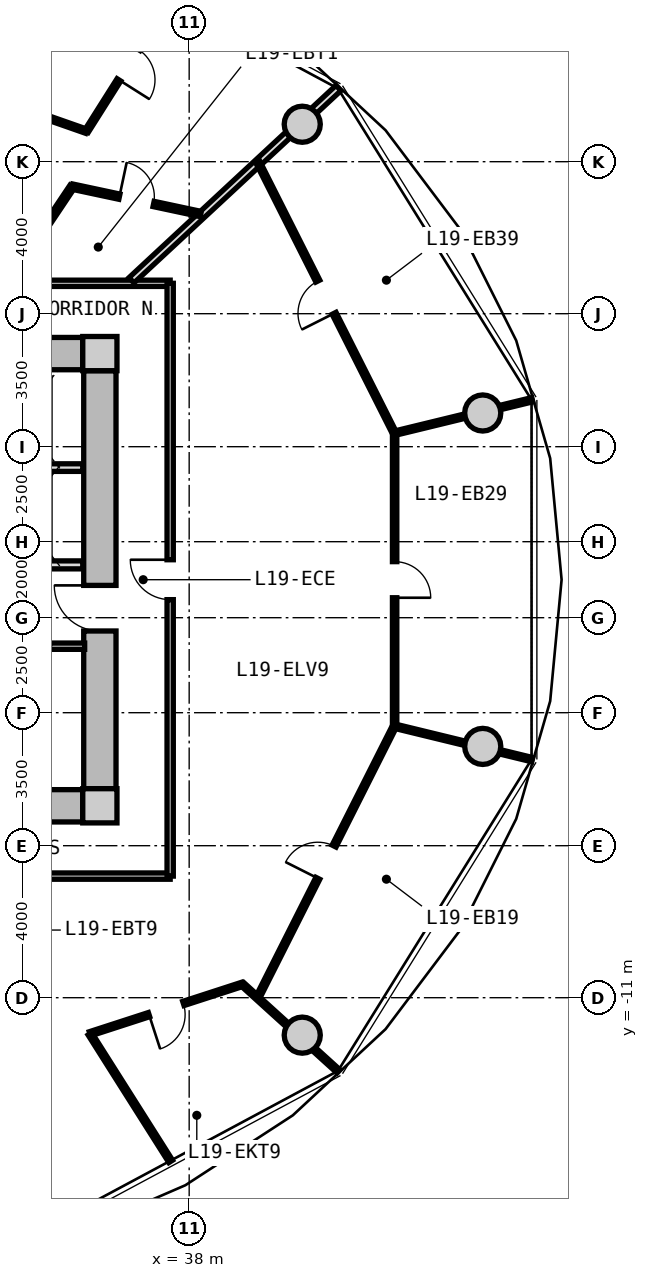
"""IFC4 building model, lengths in metres.
Left out: names, types, materials, properties, quantities, classifications, styles, units other than length and angle.
Written with IfcOpenShell. Run it as: python <this file> out.ifc"""

import sys

from ifc_helpers import new_model, si_unit, direction, frame, frame_2d, origin, origin_2d, place, context, subcontext, project, spatial, rectangle, circle, extrude, source, transform, mapped, element, fill, save


model = new_model("IFC4")
c1 = context("Model", 3, precision=1e-05, world=origin(), true_north=direction((0.0, 1.0)))
c2 = subcontext(c1, "Body", "Model", "MODEL_VIEW")
j1 = project(units=[si_unit("LENGTHUNIT", "METRE"), si_unit("PLANEANGLEUNIT", "RADIAN")], contexts=[c1])
p1 = place(None, origin())
s1 = spatial("IfcSite", under=j1, at=p1, CompositionType="ELEMENT")
p2 = place(p1, origin())
s2 = spatial("IfcBuilding", under=s1, at=p2, CompositionType="ELEMENT")
p3 = place(p2, frame((0.0, 0.0, 64.3)))
s3 = spatial("IfcBuildingStorey", under=s2, at=p3, CompositionType="ELEMENT", Elevation=64.3)
m1 = source(origin(), c2, "Body", "SweptSolid", [
    extrude(rectangle(XDim=0.9, YDim=0.9, at=origin_2d()), origin(), (0.0, 0.0, 1.0), 3.05),
])
for number, where, z_axis, x_axis in (
    (1, (35.65, -5.95, 0.0), (0.0, 0.0, 1.0), (1.0, 0.0, 0.0)),
    (2, (35.65, 5.95, 0.0), (0.0, 0.0, 1.0), (1.0, 0.0, 0.0)),
):
    element("IfcColumn", number, at=place(p3, frame(where, z_axis=z_axis, x_axis=x_axis)), inside=s3, PredefinedType="COLUMN", context=c2, shape_type="MappedRepresentation", body=[
        mapped(m1, transform((0.0, 0.0, 0.0), x_axis=(1.0, 0.0, 0.0), y_axis=(0.0, 1.0, 0.0), z_axis=(0.0, 0.0, 1.0), scale=1.0)),
    ])
m2 = source(origin(), c2, "Body", "SweptSolid", [
    extrude(rectangle(XDim=14.4, YDim=0.85, at=frame_2d((7.2, 0.0))), origin(), (0.0, 0.0, 1.0), 2.79),
])
for number, where, z_axis, x_axis in (
    (3, (20.8, 5.95, 0.0), (0.0, 0.0, 1.0), (1.0, 0.0, 0.0)),
    (4, (35.2, -5.95, 0.0), (0.0, 0.0, 1.0), (-1.0, 0.0, 0.0)),
):
    element("IfcWall", number, at=place(p3, frame(where, z_axis=z_axis, x_axis=x_axis)), inside=s3, PredefinedType="SHEAR", context=c2, shape_type="MappedRepresentation", body=[
        mapped(m2, transform((0.0, 0.0, 0.0), x_axis=(1.0, 0.0, 0.0), y_axis=(0.0, 1.0, 0.0), z_axis=(0.0, 0.0, 1.0), scale=1.0)),
    ])
m3 = source(origin(), c2, "Body", "SweptSolid", [
    extrude(rectangle(XDim=11.0, YDim=0.85, at=frame_2d((5.5, 0.0))), origin(), (0.0, 0.0, 1.0), 2.79),
])
p4 = place(p3, frame((35.65, 5.5, 0.0), z_axis=(0.0, 0.0, 1.0), x_axis=(0.0, -1.0, 0.0)))
e5 = element("IfcWall", 5, at=p4, inside=s3, PredefinedType="SHEAR", context=c2, shape_type="MappedRepresentation", body=[
    mapped(m3, transform((0.0, 0.0, 0.0), x_axis=(1.0, 0.0, 0.0), y_axis=(0.0, 1.0, 0.0), z_axis=(0.0, 0.0, 1.0), scale=1.0)),
])
p5 = place(p4, frame((5.65, 0.0, 0.0)))
e6 = element("IfcOpeningElement", 6, at=p5, cuts=e5, PredefinedType="OPENING", context=c2, shape_type="SweptSolid", body=[
    extrude(rectangle(XDim=1.2, YDim=2.15, at=frame_2d((0.6, 1.075))), frame((0.0, 0.435, 0.0), z_axis=(0.0, -1.0, 0.0), x_axis=(1.0, 0.0, 0.0)), (0.0, 0.0, 1.0), 0.87),
])
m4 = source(origin(), c2, "Body", "SweptSolid", [
    extrude(circle(Radius=0.475, at=origin_2d()), origin(), (0.0, 0.0, 1.0), 3.05),
])
for number, where, z_axis, x_axis in (
    (7, (45.725, 4.387, 0.0), (0.0, 0.0, 1.0), (1.0, 0.0, 0.0)),
    (8, (40.975, 11.985, 0.0), (0.0, 0.0, 1.0), (1.0, 0.0, 0.0)),
    (9, (40.975, -11.985, 0.0), (0.0, 0.0, 1.0), (1.0, 0.0, 0.0)),
    (10, (45.725, -4.387, 0.0), (0.0, 0.0, 1.0), (1.0, 0.0, 0.0)),
):
    element("IfcColumn", number, at=place(p3, frame(where, z_axis=z_axis, x_axis=x_axis)), inside=s3, PredefinedType="COLUMN", context=c2, shape_type="MappedRepresentation", body=[
        mapped(m4, transform((0.0, 0.0, 0.0), x_axis=(1.0, 0.0, 0.0), y_axis=(0.0, 1.0, 0.0), z_axis=(0.0, 0.0, 1.0), scale=1.0)),
    ])
m5 = source(origin(), c2, "Body", "SweptSolid", [
    extrude(rectangle(XDim=3.2, YDim=0.2, at=frame_2d((1.6, 0.0))), origin(), (0.0, 0.0, 1.0), 2.775),
])
p6 = place(p3, frame((32.0, 2.95, 0.0), z_axis=(0.0, 0.0, 1.0), x_axis=(1.0, 0.0, 0.0)))
e11 = element("IfcWall", 11, at=p6, inside=s3, PredefinedType="PARTITIONING", context=c2, shape_type="MappedRepresentation", body=[
    mapped(m5, transform((0.0, 0.0, 0.0), x_axis=(1.0, 0.0, 0.0), y_axis=(0.0, 1.0, 0.0), z_axis=(0.0, 0.0, 1.0), scale=1.0)),
])
m6 = source(origin(), c2, "Body", "SweptSolid", [
    extrude(rectangle(XDim=6.66, YDim=0.21, at=frame_2d((3.33, 0.0))), origin(), (0.0, 0.0, 1.0), 2.775),
])
p7 = place(p3, frame((28.54, 0.39, 0.0), z_axis=(0.0, 0.0, 1.0), x_axis=(1.0, 0.0, 0.0)))
e12 = element("IfcWall", 12, at=p7, inside=s3, PredefinedType="PARTITIONING", context=c2, shape_type="MappedRepresentation", body=[
    mapped(m6, transform((0.0, 0.0, 0.0), x_axis=(1.0, 0.0, 0.0), y_axis=(0.0, 1.0, 0.0), z_axis=(0.0, 0.0, 1.0), scale=1.0)),
])
p8 = place(p7, frame((1.0, 0.0, 0.0)))
e13 = element("IfcOpeningElement", 13, at=p8, cuts=e12, PredefinedType="OPENING", context=c2, shape_type="SweptSolid", body=[
    extrude(rectangle(XDim=1.2, YDim=2.15, at=frame_2d((0.6, 1.075))), frame((0.0, 0.115, 0.0), z_axis=(0.0, -1.0, 0.0), x_axis=(1.0, 0.0, 0.0)), (0.0, 0.0, 1.0), 0.23),
])
m7 = source(origin(), c2, "Body", "SweptSolid", [
    extrude(rectangle(XDim=2.7, YDim=0.165, at=frame_2d((1.35, 0.0))), origin(), (0.0, 0.0, 1.0), 2.775),
])
p9 = place(p3, frame((32.55, -1.75, 0.0), z_axis=(0.0, 0.0, 1.0), x_axis=(1.0, 0.0, 0.0)))
e14 = element("IfcWall", 14, at=p9, inside=s3, PredefinedType="PARTITIONING", context=c2, shape_type="MappedRepresentation", body=[
    mapped(m7, transform((0.0, 0.0, 0.0), x_axis=(1.0, 0.0, 0.0), y_axis=(0.0, 1.0, 0.0), z_axis=(0.0, 0.0, 1.0), scale=1.0)),
])
p10 = place(p9, frame((0.85, 0.0, 0.0)))
e15 = element("IfcOpeningElement", 15, at=p10, cuts=e14, PredefinedType="OPENING", context=c2, shape_type="SweptSolid", body=[
    extrude(rectangle(XDim=0.925, YDim=2.1, at=frame_2d((0.462, 1.05))), frame((0.0, 0.093, 0.0), z_axis=(0.0, -1.0, 0.0), x_axis=(1.0, 0.0, 0.0)), (0.0, 0.0, 1.0), 0.185),
])
m8 = source(origin(), c2, "Body", "SweptSolid", [
    extrude(rectangle(XDim=19.0, YDim=0.165, at=frame_2d((9.5, 0.0))), origin(), (0.0, 0.0, 1.0), 2.775),
])
p11 = place(p3, frame((18.5, 7.8, 0.0), z_axis=(0.0, 0.0, 1.0), x_axis=(1.0, 0.0, 0.0)))
e16 = element("IfcWall", 16, at=p11, inside=s3, PredefinedType="PARTITIONING", context=c2, shape_type="MappedRepresentation", body=[
    mapped(m8, transform((0.0, 0.0, 0.0), x_axis=(1.0, 0.0, 0.0), y_axis=(0.0, 1.0, 0.0), z_axis=(0.0, 0.0, 1.0), scale=1.0)),
])
p12 = place(p11, frame((6.961, 0.0, 0.0)))
e17 = element("IfcOpeningElement", 17, at=p12, cuts=e16, PredefinedType="OPENING", context=c2, shape_type="SweptSolid", body=[
    extrude(rectangle(XDim=1.05, YDim=2.15, at=frame_2d((0.525, 1.075))), frame((0.0, 0.093, 0.0), z_axis=(0.0, -1.0, 0.0), x_axis=(1.0, 0.0, 0.0)), (0.0, 0.0, 1.0), 0.185),
])
p13 = place(p3, frame((37.5, -7.8, 0.0), z_axis=(0.0, 0.0, 1.0), x_axis=(-1.0, 0.0, 0.0)))
e18 = element("IfcWall", 18, at=p13, inside=s3, PredefinedType="PARTITIONING", context=c2, shape_type="MappedRepresentation", body=[
    mapped(m8, transform((0.0, 0.0, 0.0), x_axis=(1.0, 0.0, 0.0), y_axis=(0.0, 1.0, 0.0), z_axis=(0.0, 0.0, 1.0), scale=1.0)),
])
p14 = place(p13, frame((10.523, 0.0, 0.0)))
e19 = element("IfcOpeningElement", 19, at=p14, cuts=e18, PredefinedType="OPENING", context=c2, shape_type="SweptSolid", body=[
    extrude(rectangle(XDim=0.92, YDim=2.1, at=frame_2d((0.46, 1.05))), frame((0.0, 0.093, 0.0), z_axis=(0.0, -1.0, 0.0), x_axis=(1.0, 0.0, 0.0)), (0.0, 0.0, 1.0), 0.185),
])
p15 = place(p13, frame((8.226, 0.0, 0.0)))
e20 = element("IfcOpeningElement", 20, at=p15, cuts=e18, PredefinedType="OPENING", context=c2, shape_type="SweptSolid", body=[
    extrude(rectangle(XDim=0.92, YDim=2.1, at=frame_2d((0.46, 1.05))), frame((0.0, 0.093, 0.0), z_axis=(0.0, -1.0, 0.0), x_axis=(1.0, 0.0, 0.0)), (0.0, 0.0, 1.0), 0.185),
])
m9 = source(origin(), c2, "Body", "SweptSolid", [
    extrude(rectangle(XDim=15.6, YDim=0.165, at=frame_2d((7.8, 0.0))), origin(), (0.0, 0.0, 1.0), 2.775),
])
p16 = place(p3, frame((37.5, 7.8, 0.0), z_axis=(0.0, 0.0, 1.0), x_axis=(0.0, -1.0, 0.0)))
e21 = element("IfcWall", 21, at=p16, inside=s3, PredefinedType="PARTITIONING", context=c2, shape_type="MappedRepresentation", body=[
    mapped(m9, transform((0.0, 0.0, 0.0), x_axis=(1.0, 0.0, 0.0), y_axis=(0.0, 1.0, 0.0), z_axis=(0.0, 0.0, 1.0), scale=1.0)),
])
p17 = place(p16, frame((7.275, 0.0, 0.0)))
e22 = element("IfcOpeningElement", 22, at=p17, cuts=e21, PredefinedType="OPENING", context=c2, shape_type="SweptSolid", body=[
    extrude(rectangle(XDim=1.05, YDim=2.15, at=frame_2d((0.525, 1.075))), frame((0.0, 0.093, 0.0), z_axis=(0.0, -1.0, 0.0), x_axis=(1.0, 0.0, 0.0)), (0.0, 0.0, 1.0), 0.185),
])
m10 = source(origin(), c2, "Body", "SweptSolid", [
    extrude(rectangle(XDim=7.435, YDim=0.19, at=frame_2d((3.717, 0.0))), origin(), (0.0, 0.0, 1.0), 2.225),
])
p18 = place(p3, frame((36.483, 7.88, 0.0), z_axis=(0.0, 0.0, 1.0), x_axis=(0.732651956848, 0.680603489652, 0.0)))
e23 = element("IfcWall", 23, at=p18, inside=s3, PredefinedType="PARTITIONING", context=c2, shape_type="MappedRepresentation", body=[
    mapped(m10, transform((0.0, 0.0, 0.0), x_axis=(1.0, 0.0, 0.0), y_axis=(0.0, 1.0, 0.0), z_axis=(0.0, 0.0, 1.0), scale=1.0)),
])
m11 = source(origin(), c2, "Body", "SweptSolid", [
    extrude(rectangle(XDim=8.018, YDim=0.115, at=frame_2d((4.009, 0.0))), origin(), (0.0, 0.0, 1.0), 2.775),
])
p19 = place(p3, frame((39.795, -11.014, 0.0), z_axis=(0.0, 0.0, 1.0), x_axis=(0.450134355233, 0.89296084026, 0.0)))
e24 = element("IfcWall", 24, at=p19, inside=s3, PredefinedType="PARTITIONING", context=c2, shape_type="MappedRepresentation", body=[
    mapped(m11, transform((0.0, 0.0, 0.0), x_axis=(1.0, 0.0, 0.0), y_axis=(0.0, 1.0, 0.0), z_axis=(0.0, 0.0, 1.0), scale=1.0)),
])
p20 = place(p19, frame((3.534, 0.0, 0.0)))
e25 = element("IfcOpeningElement", 25, at=p20, cuts=e24, PredefinedType="OPENING", context=c2, shape_type="SweptSolid", body=[
    extrude(rectangle(XDim=0.95, YDim=2.1, at=frame_2d((0.475, 1.05))), frame((0.0, 0.067, 0.0), z_axis=(0.0, -1.0, 0.0), x_axis=(1.0, 0.0, 0.0)), (0.0, 0.0, 1.0), 0.135),
])
m12 = source(origin(), c2, "Body", "SweptSolid", [
    extrude(rectangle(XDim=3.4, YDim=0.115, at=frame_2d((1.7, 0.0))), origin(), (0.0, 0.0, 1.0), 2.225),
])
p21 = place(p3, frame((39.411, -10.656, 0.0), z_axis=(0.0, 0.0, 1.0), x_axis=(0.740729005272, -0.671803945172, 0.0)))
e26 = element("IfcWall", 26, at=p21, inside=s3, PredefinedType="PARTITIONING", context=c2, shape_type="MappedRepresentation", body=[
    mapped(m12, transform((0.0, 0.0, 0.0), x_axis=(1.0, 0.0, 0.0), y_axis=(0.0, 1.0, 0.0), z_axis=(0.0, 0.0, 1.0), scale=1.0)),
])
m13 = source(origin(), c2, "Body", "SweptSolid", [
    extrude(rectangle(XDim=7.709, YDim=0.115, at=frame_2d((3.855, 0.0))), origin(), (0.0, 0.0, 1.0), 2.775),
])
p22 = place(p3, frame((43.406, -3.855, 0.0), z_axis=(0.0, 0.0, 1.0), x_axis=(0.0, 1.0, 0.0)))
e27 = element("IfcWall", 27, at=p22, inside=s3, PredefinedType="PARTITIONING", context=c2, shape_type="MappedRepresentation", body=[
    mapped(m13, transform((0.0, 0.0, 0.0), x_axis=(1.0, 0.0, 0.0), y_axis=(0.0, 1.0, 0.0), z_axis=(0.0, 0.0, 1.0), scale=1.0)),
])
p23 = place(p22, frame((3.38, 0.0, 0.0)))
e28 = element("IfcOpeningElement", 28, at=p23, cuts=e27, PredefinedType="OPENING", context=c2, shape_type="SweptSolid", body=[
    extrude(rectangle(XDim=0.95, YDim=2.1, at=frame_2d((0.475, 1.05))), frame((0.0, 0.067, 0.0), z_axis=(0.0, -1.0, 0.0), x_axis=(1.0, 0.0, 0.0)), (0.0, 0.0, 1.0), 0.135),
])
m14 = source(origin(), c2, "Body", "SweptSolid", [
    extrude(rectangle(XDim=3.728, YDim=0.115, at=frame_2d((1.864, 0.0))), origin(), (0.0, 0.0, 1.0), 2.225),
])
p24 = place(p3, frame((43.406, -3.855, 0.0), z_axis=(0.0, 0.0, 1.0), x_axis=(0.971641177968, -0.236460189624, 0.0)))
e29 = element("IfcWall", 29, at=p24, inside=s3, PredefinedType="PARTITIONING", context=c2, shape_type="MappedRepresentation", body=[
    mapped(m14, transform((0.0, 0.0, 0.0), x_axis=(1.0, 0.0, 0.0), y_axis=(0.0, 1.0, 0.0), z_axis=(0.0, 0.0, 1.0), scale=1.0)),
])
p25 = place(p3, frame((43.404, 3.854, 0.0), z_axis=(0.0, 0.0, 1.0), x_axis=(-0.450134355233, 0.89296084026, 0.0)))
e30 = element("IfcWall", 30, at=p25, inside=s3, PredefinedType="PARTITIONING", context=c2, shape_type="MappedRepresentation", body=[
    mapped(m11, transform((0.0, 0.0, 0.0), x_axis=(1.0, 0.0, 0.0), y_axis=(0.0, 1.0, 0.0), z_axis=(0.0, 0.0, 1.0), scale=1.0)),
])
p26 = place(p25, frame((3.534, 0.0, 0.0)))
e31 = element("IfcOpeningElement", 31, at=p26, cuts=e30, PredefinedType="OPENING", context=c2, shape_type="SweptSolid", body=[
    extrude(rectangle(XDim=0.95, YDim=2.1, at=frame_2d((0.475, 1.05))), frame((0.0, 0.067, 0.0), z_axis=(0.0, -1.0, 0.0), x_axis=(1.0, 0.0, 0.0)), (0.0, 0.0, 1.0), 0.135),
])
m15 = source(origin(), c2, "Body", "SweptSolid", [
    extrude(rectangle(XDim=3.73, YDim=0.115, at=frame_2d((1.865, 0.0))), origin(), (0.0, 0.0, 1.0), 2.225),
])
p27 = place(p3, frame((43.404, 3.854, 0.0), z_axis=(0.0, 0.0, 1.0), x_axis=(0.971644038568, 0.236448434791, 0.0)))
e32 = element("IfcWall", 32, at=p27, inside=s3, PredefinedType="PARTITIONING", context=c2, shape_type="MappedRepresentation", body=[
    mapped(m15, transform((0.0, 0.0, 0.0), x_axis=(1.0, 0.0, 0.0), y_axis=(0.0, 1.0, 0.0), z_axis=(0.0, 0.0, 1.0), scale=1.0)),
])
m16 = source(origin(), c2, "Body", "SweptSolid", [
    extrude(rectangle(XDim=3.974, YDim=0.115, at=frame_2d((1.987, 0.0))), origin(), (0.0, 0.0, 1.0), 2.775),
])
p28 = place(p3, frame((35.389, -11.95, 0.0), z_axis=(0.0, 0.0, 1.0), x_axis=(0.534810918023, -0.844971764003, 0.0)))
e33 = element("IfcWall", 33, at=p28, inside=s3, PredefinedType="PARTITIONING", context=c2, shape_type="MappedRepresentation", body=[
    mapped(m16, transform((0.0, 0.0, 0.0), x_axis=(1.0, 0.0, 0.0), y_axis=(0.0, 1.0, 0.0), z_axis=(0.0, 0.0, 1.0), scale=1.0)),
])
m17 = source(origin(), c2, "Body", "SweptSolid", [
    extrude(rectangle(XDim=4.22, YDim=0.115, at=frame_2d((2.11, 0.0))), origin(), (0.0, 0.0, 1.0), 2.775),
])
p29 = place(p3, frame((35.389, -11.95, 0.0), z_axis=(0.0, 0.0, 1.0), x_axis=(0.951130539873, 0.308789080315, 0.0)))
e34 = element("IfcWall", 34, at=p29, inside=s3, PredefinedType="PARTITIONING", context=c2, shape_type="MappedRepresentation", body=[
    mapped(m17, transform((0.0, 0.0, 0.0), x_axis=(1.0, 0.0, 0.0), y_axis=(0.0, 1.0, 0.0), z_axis=(0.0, 0.0, 1.0), scale=1.0)),
])
p30 = place(p29, frame((1.635, 0.0, 0.0)))
e35 = element("IfcOpeningElement", 35, at=p30, cuts=e34, PredefinedType="OPENING", context=c2, shape_type="SweptSolid", body=[
    extrude(rectangle(XDim=0.95, YDim=2.1, at=frame_2d((0.475, 1.05))), frame((0.0, 0.067, 0.0), z_axis=(0.0, -1.0, 0.0), x_axis=(1.0, 0.0, 0.0)), (0.0, 0.0, 1.0), 0.135),
])
m18 = source(origin(), c2, "Body", "SweptSolid", [
    extrude(rectangle(XDim=3.025, YDim=0.14, at=frame_2d((1.513, 0.0))), origin(), (0.0, 0.0, 1.0), 2.775),
])
p31 = place(p3, frame((33.24, 7.83, 0.0), z_axis=(0.0, 0.0, 1.0), x_axis=(0.556189165904, 0.831055721195, 0.0)))
e36 = element("IfcWall", 36, at=p31, inside=s3, PredefinedType="PARTITIONING", context=c2, shape_type="MappedRepresentation", body=[
    mapped(m18, transform((0.0, 0.0, 0.0), x_axis=(1.0, 0.0, 0.0), y_axis=(0.0, 1.0, 0.0), z_axis=(0.0, 0.0, 1.0), scale=1.0)),
])
m19 = source(origin(), c2, "Body", "SweptSolid", [
    extrude(rectangle(XDim=3.459, YDim=0.14, at=frame_2d((1.729, 0.0))), origin(), (0.0, 0.0, 1.0), 2.775),
])
p32 = place(p3, frame((34.922, 10.344, 0.0), z_axis=(0.0, 0.0, 1.0), x_axis=(0.978006468578, -0.208574560815, 0.0)))
e37 = element("IfcWall", 37, at=p32, inside=s3, PredefinedType="PARTITIONING", context=c2, shape_type="MappedRepresentation", body=[
    mapped(m19, transform((0.0, 0.0, 0.0), x_axis=(1.0, 0.0, 0.0), y_axis=(0.0, 1.0, 0.0), z_axis=(0.0, 0.0, 1.0), scale=1.0)),
])
p33 = place(p32, frame((1.27, 0.0, 0.0)))
e38 = element("IfcOpeningElement", 38, at=p33, cuts=e37, PredefinedType="OPENING", context=c2, shape_type="SweptSolid", body=[
    extrude(rectangle(XDim=0.92, YDim=2.1, at=frame_2d((0.46, 1.05))), frame((0.0, 0.08, 0.0), z_axis=(0.0, -1.0, 0.0), x_axis=(1.0, 0.0, 0.0)), (0.0, 0.0, 1.0), 0.16),
])
m20 = source(origin(), c2, "Body", "SweptSolid", [
    extrude(rectangle(XDim=4.15, YDim=0.115, at=frame_2d((2.075, 0.0))), origin(), (0.0, 0.0, 1.0), 2.775),
])
p34 = place(p3, frame((35.296, 11.801, 0.0), z_axis=(0.0, 0.0, 1.0), x_axis=(0.534475378192, 0.845184045109, 0.0)))
e39 = element("IfcWall", 39, at=p34, inside=s3, PredefinedType="PARTITIONING", context=c2, shape_type="MappedRepresentation", body=[
    mapped(m20, transform((0.0, 0.0, 0.0), x_axis=(1.0, 0.0, 0.0), y_axis=(0.0, 1.0, 0.0), z_axis=(0.0, 0.0, 1.0), scale=1.0)),
])
p35 = place(p34, frame((1.6, 0.0, 0.0)))
e40 = element("IfcOpeningElement", 40, at=p35, cuts=e39, PredefinedType="OPENING", context=c2, shape_type="SweptSolid", body=[
    extrude(rectangle(XDim=0.95, YDim=2.1, at=frame_2d((0.475, 1.05))), frame((0.0, 0.067, 0.0), z_axis=(0.0, -1.0, 0.0), x_axis=(1.0, 0.0, 0.0)), (0.0, 0.0, 1.0), 0.135),
])
m21 = source(origin(), c2, "Body", "SweptSolid", [
    extrude(rectangle(XDim=3.765, YDim=0.115, at=frame_2d((1.882, 0.0))), origin(), (0.0, 0.0, 1.0), 2.775),
])
p36 = place(p3, frame((35.296, 11.801, 0.0), z_axis=(0.0, 0.0, 1.0), x_axis=(-0.943788572669, 0.330549739222, 0.0)))
e41 = element("IfcWall", 41, at=p36, inside=s3, PredefinedType="PARTITIONING", context=c2, shape_type="MappedRepresentation", body=[
    mapped(m21, transform((0.0, 0.0, 0.0), x_axis=(1.0, 0.0, 0.0), y_axis=(0.0, 1.0, 0.0), z_axis=(0.0, 0.0, 1.0), scale=1.0)),
])
m22 = source(origin(), c2, "Body", "SweptSolid", [
    extrude(rectangle(XDim=1.2, YDim=2.15, at=frame_2d((0.6, 1.075))), frame((0.0, 0.025, 0.0), z_axis=(0.0, -1.0, 0.0), x_axis=(1.0, 0.0, 0.0)), (0.0, 0.0, 1.0), 0.05),
])
p37 = place(p5, frame((1.2, 0.0, 0.0), z_axis=(0.0, 0.0, 1.0), x_axis=(-1.0, 0.0, 0.0)))
e42 = element("IfcDoor", 42, at=p37, inside=s3, OperationType="SINGLE_SWING_RIGHT", PredefinedType="DOOR", context=c2, shape_type="MappedRepresentation", body=[
    mapped(m22, transform((0.0, 0.0, 0.0), x_axis=(1.0, 0.0, 0.0), y_axis=(0.0, 1.0, 0.0), z_axis=(0.0, 0.0, 1.0), scale=1.0)),
])
fill(e6, e42)
m23 = source(origin(), c2, "Body", "SweptSolid", [
    extrude(rectangle(XDim=1.05, YDim=2.15, at=frame_2d((0.525, 1.075))), frame((0.0, 0.025, 0.0), z_axis=(0.0, -1.0, 0.0), x_axis=(1.0, 0.0, 0.0)), (0.0, 0.0, 1.0), 0.05),
])
p38 = place(p17, frame((1.05, 0.0, 0.0), z_axis=(0.0, 0.0, 1.0), x_axis=(-1.0, 0.0, 0.0)))
e43 = element("IfcDoor", 43, at=p38, inside=s3, OperationType="SINGLE_SWING_RIGHT", PredefinedType="DOOR", context=c2, shape_type="MappedRepresentation", body=[
    mapped(m23, transform((0.0, 0.0, 0.0), x_axis=(1.0, 0.0, 0.0), y_axis=(0.0, 1.0, 0.0), z_axis=(0.0, 0.0, 1.0), scale=1.0)),
])
fill(e22, e43)
m24 = source(origin(), c2, "Body", "SweptSolid", [
    extrude(rectangle(XDim=0.95, YDim=2.1, at=frame_2d((0.475, 1.05))), frame((0.0, 0.025, 0.0), z_axis=(0.0, -1.0, 0.0), x_axis=(1.0, 0.0, 0.0)), (0.0, 0.0, 1.0), 0.05),
])
p39 = place(p30, frame((0.95, 0.0, 0.0), z_axis=(0.0, 0.0, 1.0), x_axis=(-1.0, 0.0, 0.0)))
e44 = element("IfcDoor", 44, at=p39, inside=s3, OperationType="SINGLE_SWING_RIGHT", PredefinedType="DOOR", context=c2, shape_type="MappedRepresentation", body=[
    mapped(m24, transform((0.0, 0.0, 0.0), x_axis=(1.0, 0.0, 0.0), y_axis=(0.0, 1.0, 0.0), z_axis=(0.0, 0.0, 1.0), scale=1.0)),
])
fill(e35, e44)
p40 = place(p20, origin())
e45 = element("IfcDoor", 45, at=p40, inside=s3, OperationType="SINGLE_SWING_LEFT", PredefinedType="DOOR", context=c2, shape_type="MappedRepresentation", body=[
    mapped(m24, transform((0.0, 0.0, 0.0), x_axis=(1.0, 0.0, 0.0), y_axis=(0.0, 1.0, 0.0), z_axis=(0.0, 0.0, 1.0), scale=1.0)),
])
fill(e25, e45)
p41 = place(p23, frame((0.95, 0.0, 0.0), z_axis=(0.0, 0.0, 1.0), x_axis=(-1.0, 0.0, 0.0)))
e46 = element("IfcDoor", 46, at=p41, inside=s3, OperationType="SINGLE_SWING_RIGHT", PredefinedType="DOOR", context=c2, shape_type="MappedRepresentation", body=[
    mapped(m24, transform((0.0, 0.0, 0.0), x_axis=(1.0, 0.0, 0.0), y_axis=(0.0, 1.0, 0.0), z_axis=(0.0, 0.0, 1.0), scale=1.0)),
])
fill(e28, e46)
p42 = place(p26, origin())
e47 = element("IfcDoor", 47, at=p42, inside=s3, OperationType="SINGLE_SWING_LEFT", PredefinedType="DOOR", context=c2, shape_type="MappedRepresentation", body=[
    mapped(m24, transform((0.0, 0.0, 0.0), x_axis=(1.0, 0.0, 0.0), y_axis=(0.0, 1.0, 0.0), z_axis=(0.0, 0.0, 1.0), scale=1.0)),
])
fill(e31, e47)
m25 = source(origin(), c2, "Body", "SweptSolid", [
    extrude(rectangle(XDim=0.92, YDim=2.1, at=frame_2d((0.46, 1.05))), frame((0.0, 0.025, 0.0), z_axis=(0.0, -1.0, 0.0), x_axis=(1.0, 0.0, 0.0)), (0.0, 0.0, 1.0), 0.05),
])
p43 = place(p33, origin())
e48 = element("IfcDoor", 48, at=p43, inside=s3, OperationType="SINGLE_SWING_LEFT", PredefinedType="DOOR", context=c2, shape_type="MappedRepresentation", body=[
    mapped(m25, transform((0.0, 0.0, 0.0), x_axis=(1.0, 0.0, 0.0), y_axis=(0.0, 1.0, 0.0), z_axis=(0.0, 0.0, 1.0), scale=1.0)),
])
fill(e38, e48)
p44 = place(p35, frame((0.95, 0.0, 0.0), z_axis=(0.0, 0.0, 1.0), x_axis=(-1.0, 0.0, 0.0)))
e49 = element("IfcDoor", 49, at=p44, inside=s3, OperationType="SINGLE_SWING_RIGHT", PredefinedType="DOOR", context=c2, shape_type="MappedRepresentation", body=[
    mapped(m24, transform((0.0, 0.0, 0.0), x_axis=(1.0, 0.0, 0.0), y_axis=(0.0, 1.0, 0.0), z_axis=(0.0, 0.0, 1.0), scale=1.0)),
])
fill(e40, e49)
save(model, sys.argv[1])
